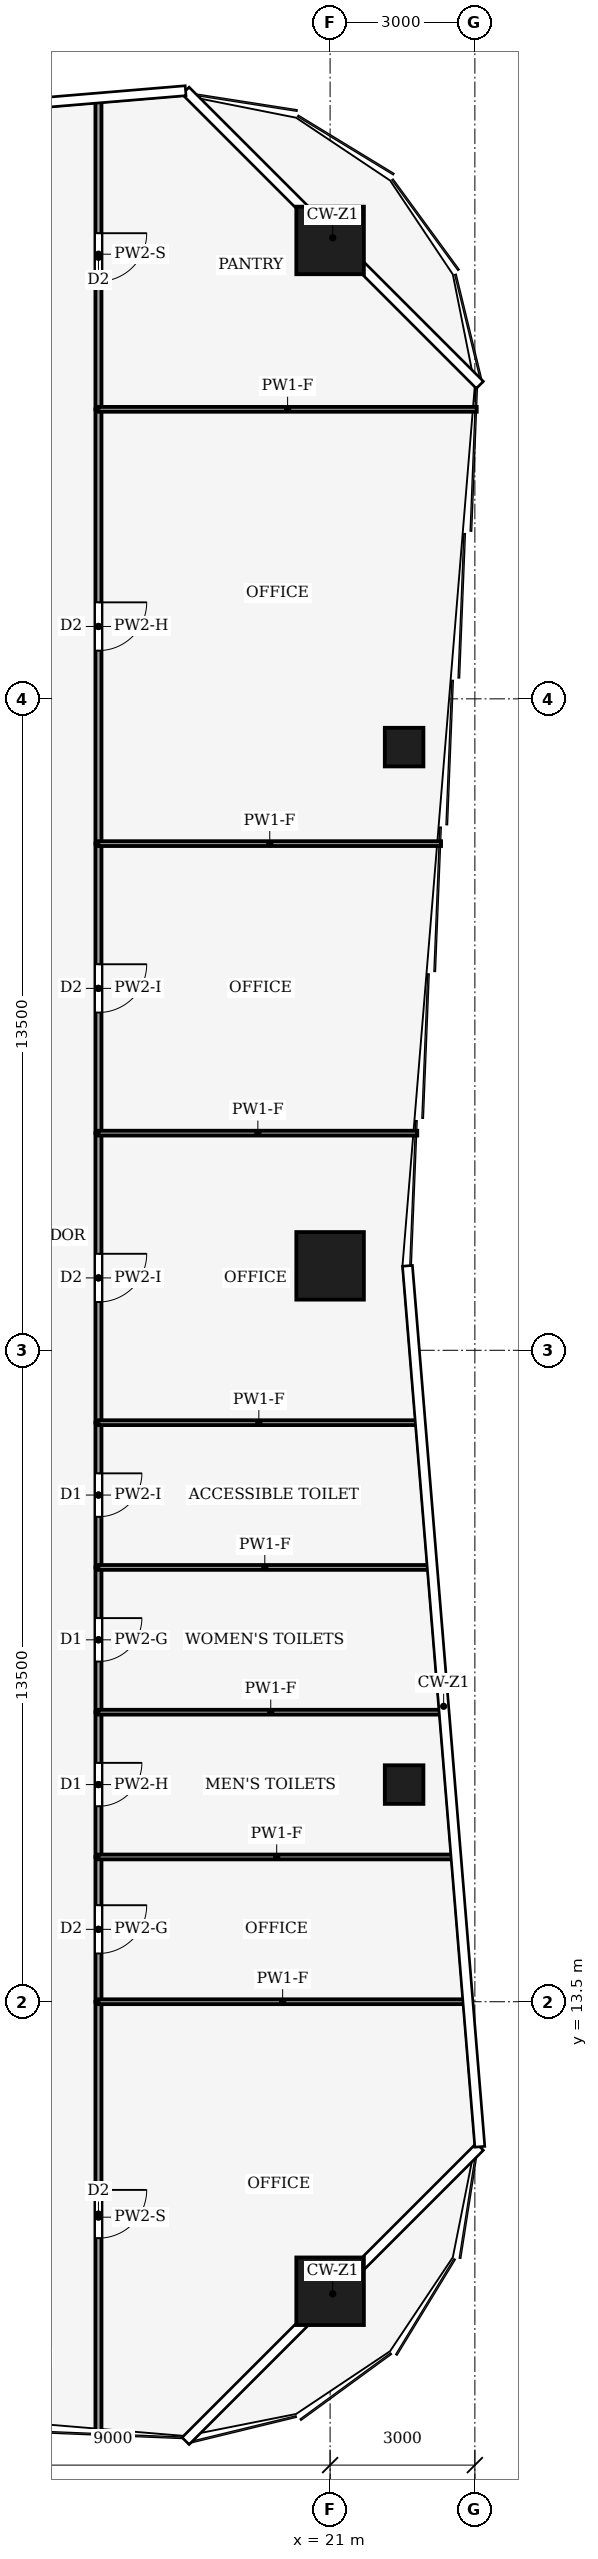
"""IFC4 building model, lengths in metres.
Left out: names, types, materials, properties, quantities, classifications, styles, units other than length and angle.
Written with IfcOpenShell. Run it as: python <this file> out.ifc"""

import sys

from ifc_helpers import new_model, si_unit, direction, frame, frame_2d, origin, origin_2d, place, context, subcontext, project, spatial, rectangle, hollow_rectangle, extrude, element, fill, save


model = new_model("IFC4")
c1 = context("Model", 3, precision=1e-05, world=origin(), true_north=direction((0.0, 1.0)))
c2 = subcontext(c1, "Body", "Model", "MODEL_VIEW")
j1 = project(units=[si_unit("LENGTHUNIT", "METRE"), si_unit("PLANEANGLEUNIT", "RADIAN")], contexts=[c1])
p1 = place(None, origin())
s1 = spatial("IfcSite", under=j1, at=p1, CompositionType="ELEMENT")
p2 = place(p1, origin())
s2 = spatial("IfcBuilding", under=s1, at=p2, CompositionType="ELEMENT")
p3 = place(p2, frame((0.0, 0.0, 90.0)))
s3 = spatial("IfcBuildingStorey", under=s2, at=p3, CompositionType="ELEMENT", Elevation=90.0)
for number, where, z_axis, x_axis in (
    (1, (21.0, 50.0, 0.0), (0.0, 0.0, 1.0), (1.0, 0.0, 0.0)),
    (2, (21.0, 28.75, 0.0), (0.0, 0.0, 1.0), (1.0, 0.0, 0.0)),
    (3, (21.0, 7.5, 0.0), (0.0, 0.0, 1.0), (1.0, 0.0, 0.0)),
):
    element("IfcColumn", number, at=place(p3, frame(where, z_axis=z_axis, x_axis=x_axis)), inside=s3, PredefinedType="COLUMN", context=c2, shape_type="SweptSolid", body=[
        extrude(hollow_rectangle(XDim=1.4, YDim=1.4, WallThickness=0.08, at=origin_2d()), origin(), (0.0, 0.0, 1.0), 4.0),
    ])
for number, where, z_axis, x_axis in (
    (4, (22.534, 18.0, 0.0), (0.0, 0.0, 1.0), (1.0, 0.0, 0.0)),
    (5, (22.534, 39.5, 0.0), (0.0, 0.0, 1.0), (1.0, 0.0, 0.0)),
):
    element("IfcColumn", number, at=place(p3, frame(where, z_axis=z_axis, x_axis=x_axis)), inside=s3, PredefinedType="COLUMN", context=c2, shape_type="SweptSolid", body=[
        extrude(hollow_rectangle(XDim=0.8, YDim=0.8, WallThickness=0.04, at=origin_2d()), origin(), (0.0, 0.0, 1.0), 4.0),
    ])
p4 = place(p3, frame((16.2, 13.5, 0.0), z_axis=(0.0, 0.0, 1.0), x_axis=(0.0, -1.0, 0.0)))
e6 = element("IfcWall", 6, at=p4, inside=s3, PredefinedType="PARTITIONING", context=c2, shape_type="SweptSolid", body=[
    extrude(rectangle(XDim=8.93, YDim=0.125, at=frame_2d((4.465, 0.0))), origin(), (0.0, 0.0, 1.0), 3.04),
])
p5 = place(p4, frame((3.9, 0.0, 0.0)))
e7 = element("IfcOpeningElement", 7, at=p5, cuts=e6, PredefinedType="OPENING", context=c2, shape_type="SweptSolid", body=[
    extrude(rectangle(XDim=1.0, YDim=2.1, at=frame_2d((0.5, 1.05))), frame((0.0, 0.073, 0.0), z_axis=(0.0, -1.0, 0.0), x_axis=(1.0, 0.0, 0.0)), (0.0, 0.0, 1.0), 0.145),
])
p6 = place(p3, frame((16.2, 16.5, 0.0), z_axis=(0.0, 0.0, 1.0), x_axis=(0.0, -1.0, 0.0)))
e8 = element("IfcWall", 8, at=p6, inside=s3, PredefinedType="PARTITIONING", context=c2, shape_type="SweptSolid", body=[
    extrude(rectangle(XDim=3.0, YDim=0.125, at=frame_2d((1.5, 0.0))), origin(), (0.0, 0.0, 1.0), 3.87),
])
p7 = place(p6, frame((1.0, 0.0, 0.0)))
e9 = element("IfcOpeningElement", 9, at=p7, cuts=e8, PredefinedType="OPENING", context=c2, shape_type="SweptSolid", body=[
    extrude(rectangle(XDim=1.0, YDim=2.1, at=frame_2d((0.5, 1.05))), frame((0.0, 0.073, 0.0), z_axis=(0.0, -1.0, 0.0), x_axis=(1.0, 0.0, 0.0)), (0.0, 0.0, 1.0), 0.145),
])
p8 = place(p3, frame((16.2, 19.5, 0.0), z_axis=(0.0, 0.0, 1.0), x_axis=(0.0, -1.0, 0.0)))
e10 = element("IfcWall", 10, at=p8, inside=s3, PredefinedType="PARTITIONING", context=c2, shape_type="SweptSolid", body=[
    extrude(rectangle(XDim=3.0, YDim=0.125, at=frame_2d((1.5, 0.0))), origin(), (0.0, 0.0, 1.0), 3.14),
])
p9 = place(p8, frame((1.05, 0.0, 0.0)))
e11 = element("IfcOpeningElement", 11, at=p9, cuts=e10, PredefinedType="OPENING", context=c2, shape_type="SweptSolid", body=[
    extrude(rectangle(XDim=0.9, YDim=2.1, at=frame_2d((0.45, 1.05))), frame((0.0, 0.073, 0.0), z_axis=(0.0, -1.0, 0.0), x_axis=(1.0, 0.0, 0.0)), (0.0, 0.0, 1.0), 0.145),
])
p10 = place(p3, frame((16.2, 22.5, 0.0), z_axis=(0.0, 0.0, 1.0), x_axis=(0.0, -1.0, 0.0)))
e12 = element("IfcWall", 12, at=p10, inside=s3, PredefinedType="PARTITIONING", context=c2, shape_type="SweptSolid", body=[
    extrude(rectangle(XDim=3.0, YDim=0.125, at=frame_2d((1.5, 0.0))), origin(), (0.0, 0.0, 1.0), 3.87),
])
p11 = place(p10, frame((1.05, 0.0, 0.0)))
e13 = element("IfcOpeningElement", 13, at=p11, cuts=e12, PredefinedType="OPENING", context=c2, shape_type="SweptSolid", body=[
    extrude(rectangle(XDim=0.9, YDim=2.1, at=frame_2d((0.45, 1.05))), frame((0.0, 0.073, 0.0), z_axis=(0.0, -1.0, 0.0), x_axis=(1.0, 0.0, 0.0)), (0.0, 0.0, 1.0), 0.145),
])
p12 = place(p3, frame((16.2, 25.5, 0.0), z_axis=(0.0, 0.0, 1.0), x_axis=(0.0, -1.0, 0.0)))
e14 = element("IfcWall", 14, at=p12, inside=s3, PredefinedType="PARTITIONING", context=c2, shape_type="SweptSolid", body=[
    extrude(rectangle(XDim=3.0, YDim=0.125, at=frame_2d((1.5, 0.0))), origin(), (0.0, 0.0, 1.0), 3.48),
])
p13 = place(p12, frame((1.05, 0.0, 0.0)))
e15 = element("IfcOpeningElement", 15, at=p13, cuts=e14, PredefinedType="OPENING", context=c2, shape_type="SweptSolid", body=[
    extrude(rectangle(XDim=0.9, YDim=2.1, at=frame_2d((0.45, 1.05))), frame((0.0, 0.073, 0.0), z_axis=(0.0, -1.0, 0.0), x_axis=(1.0, 0.0, 0.0)), (0.0, 0.0, 1.0), 0.145),
])
p14 = place(p3, frame((16.2, 31.5, 0.0), z_axis=(0.0, 0.0, 1.0), x_axis=(0.0, -1.0, 0.0)))
e16 = element("IfcWall", 16, at=p14, inside=s3, PredefinedType="PARTITIONING", context=c2, shape_type="SweptSolid", body=[
    extrude(rectangle(XDim=6.0, YDim=0.125, at=frame_2d((3.0, 0.0))), origin(), (0.0, 0.0, 1.0), 3.48),
])
p15 = place(p14, frame((2.5, 0.0, 0.0)))
e17 = element("IfcOpeningElement", 17, at=p15, cuts=e16, PredefinedType="OPENING", context=c2, shape_type="SweptSolid", body=[
    extrude(rectangle(XDim=1.0, YDim=2.1, at=frame_2d((0.5, 1.05))), frame((0.0, 0.073, 0.0), z_axis=(0.0, -1.0, 0.0), x_axis=(1.0, 0.0, 0.0)), (0.0, 0.0, 1.0), 0.145),
])
p16 = place(p3, frame((16.2, 37.5, 0.0), z_axis=(0.0, 0.0, 1.0), x_axis=(0.0, -1.0, 0.0)))
e18 = element("IfcWall", 18, at=p16, inside=s3, PredefinedType="PARTITIONING", context=c2, shape_type="SweptSolid", body=[
    extrude(rectangle(XDim=6.0, YDim=0.125, at=frame_2d((3.0, 0.0))), origin(), (0.0, 0.0, 1.0), 3.48),
])
p17 = place(p16, frame((2.5, 0.0, 0.0)))
e19 = element("IfcOpeningElement", 19, at=p17, cuts=e18, PredefinedType="OPENING", context=c2, shape_type="SweptSolid", body=[
    extrude(rectangle(XDim=1.0, YDim=2.1, at=frame_2d((0.5, 1.05))), frame((0.0, 0.073, 0.0), z_axis=(0.0, -1.0, 0.0), x_axis=(1.0, 0.0, 0.0)), (0.0, 0.0, 1.0), 0.145),
])
p18 = place(p3, frame((16.2, 46.5, 0.0), z_axis=(0.0, 0.0, 1.0), x_axis=(0.0, -1.0, 0.0)))
e20 = element("IfcWall", 20, at=p18, inside=s3, PredefinedType="PARTITIONING", context=c2, shape_type="SweptSolid", body=[
    extrude(rectangle(XDim=9.0, YDim=0.125, at=frame_2d((4.5, 0.0))), origin(), (0.0, 0.0, 1.0), 3.14),
])
p19 = place(p18, frame((4.0, 0.0, 0.0)))
e21 = element("IfcOpeningElement", 21, at=p19, cuts=e20, PredefinedType="OPENING", context=c2, shape_type="SweptSolid", body=[
    extrude(rectangle(XDim=1.0, YDim=2.1, at=frame_2d((0.5, 1.05))), frame((0.0, 0.073, 0.0), z_axis=(0.0, -1.0, 0.0), x_axis=(1.0, 0.0, 0.0)), (0.0, 0.0, 1.0), 0.145),
])
p20 = place(p3, frame((16.2, 52.93, 0.0), z_axis=(0.0, 0.0, 1.0), x_axis=(0.0, -1.0, 0.0)))
e22 = element("IfcWall", 22, at=p20, inside=s3, PredefinedType="PARTITIONING", context=c2, shape_type="SweptSolid", body=[
    extrude(rectangle(XDim=6.43, YDim=0.125, at=frame_2d((3.215, 0.0))), origin(), (0.0, 0.0, 1.0), 3.04),
])
p21 = place(p20, frame((2.78, 0.0, 0.0)))
e23 = element("IfcOpeningElement", 23, at=p21, cuts=e22, PredefinedType="OPENING", context=c2, shape_type="SweptSolid", body=[
    extrude(rectangle(XDim=1.0, YDim=2.1, at=frame_2d((0.5, 1.05))), frame((0.0, 0.073, 0.0), z_axis=(0.0, -1.0, 0.0), x_axis=(1.0, 0.0, 0.0)), (0.0, 0.0, 1.0), 0.145),
])
p22 = place(p3, frame((23.833, 13.5, 0.0), z_axis=(0.0, 0.0, 1.0), x_axis=(-1.0, 0.0, 0.0)))
e24 = element("IfcWall", 24, at=p22, inside=s3, PredefinedType="PARTITIONING", context=c2, shape_type="SweptSolid", body=[
    extrude(rectangle(XDim=7.634, YDim=0.1, at=frame_2d((3.817, 0.0))), origin(), (0.0, 0.0, 1.0), 3.04),
])
p23 = place(p3, frame((23.587, 16.5, 0.0), z_axis=(0.0, 0.0, 1.0), x_axis=(-1.0, 0.0, 0.0)))
e25 = element("IfcWall", 25, at=p23, inside=s3, PredefinedType="PARTITIONING", context=c2, shape_type="SweptSolid", body=[
    extrude(rectangle(XDim=7.387, YDim=0.1, at=frame_2d((3.693, 0.0))), origin(), (0.0, 0.0, 1.0), 3.04),
])
p24 = place(p3, frame((23.34, 19.5, 0.0), z_axis=(0.0, 0.0, 1.0), x_axis=(-1.0, 0.0, 0.0)))
e26 = element("IfcWall", 26, at=p24, inside=s3, PredefinedType="PARTITIONING", context=c2, shape_type="SweptSolid", body=[
    extrude(rectangle(XDim=7.14, YDim=0.1, at=frame_2d((3.57, 0.0))), origin(), (0.0, 0.0, 1.0), 3.04),
])
p25 = place(p3, frame((23.094, 22.5, 0.0), z_axis=(0.0, 0.0, 1.0), x_axis=(-1.0, 0.0, 0.0)))
e27 = element("IfcWall", 27, at=p25, inside=s3, PredefinedType="PARTITIONING", context=c2, shape_type="SweptSolid", body=[
    extrude(rectangle(XDim=6.894, YDim=0.1, at=frame_2d((3.447, 0.0))), origin(), (0.0, 0.0, 1.0), 3.04),
])
p26 = place(p3, frame((22.847, 25.5, 0.0), z_axis=(0.0, 0.0, 1.0), x_axis=(-1.0, 0.0, 0.0)))
e28 = element("IfcWall", 28, at=p26, inside=s3, PredefinedType="PARTITIONING", context=c2, shape_type="SweptSolid", body=[
    extrude(rectangle(XDim=6.647, YDim=0.1, at=frame_2d((3.324, 0.0))), origin(), (0.0, 0.0, 1.0), 3.04),
])
p27 = place(p3, frame((22.806, 31.5, 0.0), z_axis=(0.0, 0.0, 1.0), x_axis=(-1.0, 0.0, 0.0)))
e29 = element("IfcWall", 29, at=p27, inside=s3, PredefinedType="PARTITIONING", context=c2, shape_type="SweptSolid", body=[
    extrude(rectangle(XDim=6.606, YDim=0.1, at=frame_2d((3.303, 0.0))), origin(), (0.0, 0.0, 1.0), 3.04),
])
p28 = place(p3, frame((23.299, 37.5, 0.0), z_axis=(0.0, 0.0, 1.0), x_axis=(-1.0, 0.0, 0.0)))
e30 = element("IfcWall", 30, at=p28, inside=s3, PredefinedType="PARTITIONING", context=c2, shape_type="SweptSolid", body=[
    extrude(rectangle(XDim=7.099, YDim=0.1, at=frame_2d((3.55, 0.0))), origin(), (0.0, 0.0, 1.0), 3.04),
])
p29 = place(p3, frame((24.039, 46.5, 0.0), z_axis=(0.0, 0.0, 1.0), x_axis=(-1.0, 0.0, 0.0)))
e31 = element("IfcWall", 31, at=p29, inside=s3, PredefinedType="PARTITIONING", context=c2, shape_type="SweptSolid", body=[
    extrude(rectangle(XDim=7.839, YDim=0.1, at=frame_2d((3.919, 0.0))), origin(), (0.0, 0.0, 1.0), 3.04),
])
p30 = place(p5, origin())
e32 = element("IfcDoor", 32, at=p30, inside=s3, OperationType="SINGLE_SWING_LEFT", PredefinedType="DOOR", context=c2, shape_type="SweptSolid", body=[
    extrude(rectangle(XDim=1.0, YDim=2.1, at=frame_2d((0.5, 1.05))), frame((0.0, 0.025, 0.0), z_axis=(0.0, -1.0, 0.0), x_axis=(1.0, 0.0, 0.0)), (0.0, 0.0, 1.0), 0.05),
])
fill(e7, e32)
p31 = place(p7, origin())
e33 = element("IfcDoor", 33, at=p31, inside=s3, OperationType="SINGLE_SWING_LEFT", PredefinedType="DOOR", context=c2, shape_type="SweptSolid", body=[
    extrude(rectangle(XDim=1.0, YDim=2.1, at=frame_2d((0.5, 1.05))), frame((0.0, 0.025, 0.0), z_axis=(0.0, -1.0, 0.0), x_axis=(1.0, 0.0, 0.0)), (0.0, 0.0, 1.0), 0.05),
])
fill(e9, e33)
p32 = place(p9, origin())
e34 = element("IfcDoor", 34, at=p32, inside=s3, OperationType="SINGLE_SWING_RIGHT", PredefinedType="DOOR", context=c2, shape_type="SweptSolid", body=[
    extrude(rectangle(XDim=0.9, YDim=2.1, at=frame_2d((0.45, 1.05))), frame((0.0, 0.025, 0.0), z_axis=(0.0, -1.0, 0.0), x_axis=(1.0, 0.0, 0.0)), (0.0, 0.0, 1.0), 0.05),
])
fill(e11, e34)
p33 = place(p11, origin())
e35 = element("IfcDoor", 35, at=p33, inside=s3, OperationType="SINGLE_SWING_LEFT", PredefinedType="DOOR", context=c2, shape_type="SweptSolid", body=[
    extrude(rectangle(XDim=0.9, YDim=2.1, at=frame_2d((0.45, 1.05))), frame((0.0, 0.025, 0.0), z_axis=(0.0, -1.0, 0.0), x_axis=(1.0, 0.0, 0.0)), (0.0, 0.0, 1.0), 0.05),
])
fill(e13, e35)
p34 = place(p13, origin())
e36 = element("IfcDoor", 36, at=p34, inside=s3, OperationType="SINGLE_SWING_RIGHT", PredefinedType="DOOR", context=c2, shape_type="SweptSolid", body=[
    extrude(rectangle(XDim=0.9, YDim=2.1, at=frame_2d((0.45, 1.05))), frame((0.0, 0.025, 0.0), z_axis=(0.0, -1.0, 0.0), x_axis=(1.0, 0.0, 0.0)), (0.0, 0.0, 1.0), 0.05),
])
fill(e15, e36)
p35 = place(p15, origin())
e37 = element("IfcDoor", 37, at=p35, inside=s3, OperationType="SINGLE_SWING_LEFT", PredefinedType="DOOR", context=c2, shape_type="SweptSolid", body=[
    extrude(rectangle(XDim=1.0, YDim=2.1, at=frame_2d((0.5, 1.05))), frame((0.0, 0.025, 0.0), z_axis=(0.0, -1.0, 0.0), x_axis=(1.0, 0.0, 0.0)), (0.0, 0.0, 1.0), 0.05),
])
fill(e17, e37)
p36 = place(p17, origin())
e38 = element("IfcDoor", 38, at=p36, inside=s3, OperationType="SINGLE_SWING_RIGHT", PredefinedType="DOOR", context=c2, shape_type="SweptSolid", body=[
    extrude(rectangle(XDim=1.0, YDim=2.1, at=frame_2d((0.5, 1.05))), frame((0.0, 0.025, 0.0), z_axis=(0.0, -1.0, 0.0), x_axis=(1.0, 0.0, 0.0)), (0.0, 0.0, 1.0), 0.05),
])
fill(e19, e38)
p37 = place(p19, origin())
e39 = element("IfcDoor", 39, at=p37, inside=s3, OperationType="SINGLE_SWING_LEFT", PredefinedType="DOOR", context=c2, shape_type="SweptSolid", body=[
    extrude(rectangle(XDim=1.0, YDim=2.1, at=frame_2d((0.5, 1.05))), frame((0.0, 0.025, 0.0), z_axis=(0.0, -1.0, 0.0), x_axis=(1.0, 0.0, 0.0)), (0.0, 0.0, 1.0), 0.05),
])
fill(e21, e39)
p38 = place(p21, origin())
e40 = element("IfcDoor", 40, at=p38, inside=s3, OperationType="SINGLE_SWING_RIGHT", PredefinedType="DOOR", context=c2, shape_type="SweptSolid", body=[
    extrude(rectangle(XDim=1.0, YDim=2.1, at=frame_2d((0.5, 1.05))), frame((0.0, 0.025, 0.0), z_axis=(0.0, -1.0, 0.0), x_axis=(1.0, 0.0, 0.0)), (0.0, 0.0, 1.0), 0.05),
])
fill(e23, e40)
save(model, sys.argv[1])
